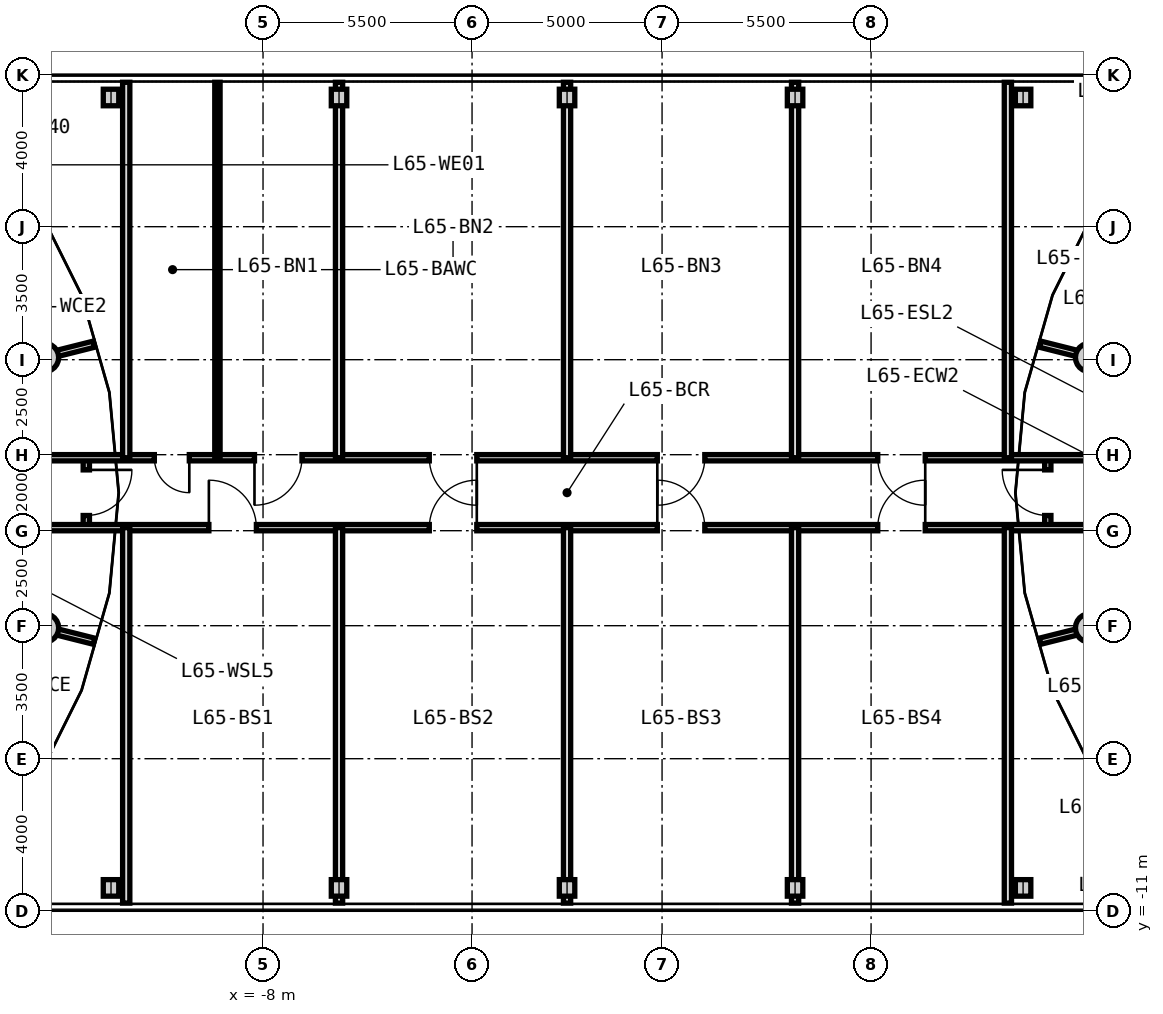
"""IFC4 building model, lengths in metres.
Left out: names, types, materials, properties, quantities, classifications, styles, units other than length and angle.
Written with IfcOpenShell. Run it as: python <this file> out.ifc"""

import sys

from ifc_helpers import new_model, si_unit, direction, frame, frame_2d, origin, origin_2d, place, context, subcontext, project, spatial, rectangle, circle, i_section, extrude, source, transform, mapped, element, fill, save


model = new_model("IFC4")
c1 = context("Model", 3, precision=1e-05, world=origin(), true_north=direction((0.0, 1.0)))
c2 = subcontext(c1, "Body", "Model", "MODEL_VIEW")
j1 = project(units=[si_unit("LENGTHUNIT", "METRE"), si_unit("PLANEANGLEUNIT", "RADIAN")], contexts=[c1])
p1 = place(None, origin())
s1 = spatial("IfcSite", under=j1, at=p1, CompositionType="ELEMENT")
p2 = place(p1, origin())
s2 = spatial("IfcBuilding", under=s1, at=p2, CompositionType="ELEMENT")
p3 = place(p2, frame((0.0, 0.0, 210.85)))
s3 = spatial("IfcBuildingStorey", under=s2, at=p3, CompositionType="ELEMENT", Elevation=210.85)
m1 = source(origin(), c2, "Body", "SweptSolid", [
    extrude(circle(Radius=0.375, at=origin_2d()), origin(), (0.0, 0.0, 1.0), 3.05),
])
for number, where, z_axis, x_axis in (
    (1, (-13.753, 3.559, 0.0), (0.0, 0.0, 1.0), (1.0, 0.0, 0.0)),
    (2, (-13.753, -3.559, 0.0), (0.0, 0.0, 1.0), (1.0, 0.0, 0.0)),
    (3, (13.753, 3.559, 0.0), (0.0, 0.0, 1.0), (1.0, 0.0, 0.0)),
    (4, (13.753, -3.559, 0.0), (0.0, 0.0, 1.0), (1.0, 0.0, 0.0)),
):
    element("IfcColumn", number, at=place(p3, frame(where, z_axis=z_axis, x_axis=x_axis)), inside=s3, PredefinedType="COLUMN", context=c2, shape_type="MappedRepresentation", body=[
        mapped(m1, transform((0.0, 0.0, 0.0), x_axis=(1.0, 0.0, 0.0), y_axis=(0.0, 1.0, 0.0), z_axis=(0.0, 0.0, 1.0), scale=1.0)),
    ])
m2 = source(origin(), c2, "Body", "SweptSolid", [
    extrude(i_section(OverallWidth=0.407, OverallDepth=0.435, WebThickness=0.024, FlangeThickness=0.039, FilletRadius=0.015, at=origin_2d()), origin(), (0.0, 0.0, 1.0), 3.05),
])
for number, where, z_axis, x_axis in (
    (5, (-12.0, -10.4, 0.0), (0.0, 0.0, 1.0), (1.0, 0.0, 0.0)),
    (6, (-12.0, 10.4, 0.0), (0.0, 0.0, 1.0), (1.0, 0.0, 0.0)),
    (7, (-6.0, -10.4, 0.0), (0.0, 0.0, 1.0), (1.0, 0.0, 0.0)),
    (8, (-6.0, 10.4, 0.0), (0.0, 0.0, 1.0), (1.0, 0.0, 0.0)),
    (9, (0.0, -10.4, 0.0), (0.0, 0.0, 1.0), (1.0, 0.0, 0.0)),
    (10, (0.0, 10.4, 0.0), (0.0, 0.0, 1.0), (1.0, 0.0, 0.0)),
    (11, (6.0, -10.4, 0.0), (0.0, 0.0, 1.0), (1.0, 0.0, 0.0)),
    (12, (6.0, 10.4, 0.0), (0.0, 0.0, 1.0), (1.0, 0.0, 0.0)),
    (13, (12.0, -10.4, 0.0), (0.0, 0.0, 1.0), (1.0, 0.0, 0.0)),
    (14, (12.0, 10.4, 0.0), (0.0, 0.0, 1.0), (1.0, 0.0, 0.0)),
):
    element("IfcColumn", number, at=place(p3, frame(where, z_axis=z_axis, x_axis=x_axis)), inside=s3, PredefinedType="COLUMN", context=c2, shape_type="MappedRepresentation", body=[
        mapped(m2, transform((0.0, 0.0, 0.0), x_axis=(1.0, 0.0, 0.0), y_axis=(0.0, 1.0, 0.0), z_axis=(0.0, 0.0, 1.0), scale=1.0)),
    ])
m3 = source(origin(), c2, "Body", "SweptSolid", [
    extrude(rectangle(XDim=6.157, YDim=0.165, at=frame_2d((3.079, 0.0))), origin(), (0.0, 0.0, 1.0), 2.345),
])
for number, where, z_axis, x_axis in (
    (15, (-18.42, -2.407, 0.0), (0.0, 0.0, 1.0), (0.97, -0.244, 0.0)),
    (16, (-18.42, 2.407, 0.0), (0.0, 0.0, 1.0), (0.97, 0.244, 0.0)),
    (17, (18.42, 2.407, 0.0), (0.0, 0.0, 1.0), (-0.97, 0.244, 0.0)),
    (18, (18.42, -2.407, 0.0), (0.0, 0.0, 1.0), (-0.97, -0.244, 0.0)),
):
    element("IfcWall", number, at=place(p3, frame(where, z_axis=z_axis, x_axis=x_axis)), inside=s3, PredefinedType="PARTITIONING", context=c2, shape_type="MappedRepresentation", body=[
        mapped(m3, transform((0.0, 0.0, 0.0), x_axis=(1.0, 0.0, 0.0), y_axis=(0.0, 1.0, 0.0), z_axis=(0.0, 0.0, 1.0), scale=1.0)),
    ])
m4 = source(origin(), c2, "Body", "SweptSolid", [
    extrude(rectangle(XDim=1.84, YDim=0.165, at=frame_2d((0.92, 0.0))), origin(), (0.0, 0.0, 1.0), 2.745),
])
p4 = place(p3, frame((-12.65, -0.92, 0.0), z_axis=(0.0, 0.0, 1.0), x_axis=(0.0, 1.0, 0.0)))
e19 = element("IfcWall", 19, at=p4, inside=s3, PredefinedType="PARTITIONING", context=c2, shape_type="MappedRepresentation", body=[
    mapped(m4, transform((0.0, 0.0, 0.0), x_axis=(1.0, 0.0, 0.0), y_axis=(0.0, 1.0, 0.0), z_axis=(0.0, 0.0, 1.0), scale=1.0)),
])
p5 = place(p4, frame((0.32, 0.0, 0.0)))
e20 = element("IfcOpeningElement", 20, at=p5, cuts=e19, PredefinedType="OPENING", context=c2, shape_type="SweptSolid", body=[
    extrude(rectangle(XDim=1.2, YDim=2.15, at=frame_2d((0.6, 1.075))), frame((0.0, 0.093, 0.0), z_axis=(0.0, -1.0, 0.0), x_axis=(1.0, 0.0, 0.0)), (0.0, 0.0, 1.0), 0.185),
])
p6 = place(p3, frame((12.65, -0.92, 0.0), z_axis=(0.0, 0.0, 1.0), x_axis=(0.0, 1.0, 0.0)))
e21 = element("IfcWall", 21, at=p6, inside=s3, PredefinedType="PARTITIONING", context=c2, shape_type="MappedRepresentation", body=[
    mapped(m4, transform((0.0, 0.0, 0.0), x_axis=(1.0, 0.0, 0.0), y_axis=(0.0, 1.0, 0.0), z_axis=(0.0, 0.0, 1.0), scale=1.0)),
])
p7 = place(p6, frame((0.32, 0.0, 0.0)))
e22 = element("IfcOpeningElement", 22, at=p7, cuts=e21, PredefinedType="OPENING", context=c2, shape_type="SweptSolid", body=[
    extrude(rectangle(XDim=1.2, YDim=2.15, at=frame_2d((0.6, 1.075))), frame((0.0, 0.093, 0.0), z_axis=(0.0, -1.0, 0.0), x_axis=(1.0, 0.0, 0.0)), (0.0, 0.0, 1.0), 0.185),
])
m5 = source(origin(), c2, "Body", "SweptSolid", [
    extrude(rectangle(XDim=37.0, YDim=0.165, at=frame_2d((18.5, 0.0))), origin(), (0.0, 0.0, 1.0), 2.745),
])
p8 = place(p3, frame((-18.5, -0.92, 0.0), z_axis=(0.0, 0.0, 1.0), x_axis=(1.0, 0.0, 0.0)))
e23 = element("IfcWall", 23, at=p8, inside=s3, PredefinedType="PARTITIONING", context=c2, shape_type="MappedRepresentation", body=[
    mapped(m5, transform((0.0, 0.0, 0.0), x_axis=(1.0, 0.0, 0.0), y_axis=(0.0, 1.0, 0.0), z_axis=(0.0, 0.0, 1.0), scale=1.0)),
])
p9 = place(p8, frame((2.662, 0.0, 0.0)))
e24 = element("IfcOpeningElement", 24, at=p9, cuts=e23, PredefinedType="OPENING", context=c2, shape_type="SweptSolid", body=[
    extrude(rectangle(XDim=0.95, YDim=2.1, at=frame_2d((0.475, 1.05))), frame((0.0, 0.093, 0.0), z_axis=(0.0, -1.0, 0.0), x_axis=(1.0, 0.0, 0.0)), (0.0, 0.0, 1.0), 0.185),
])
p10 = place(p8, frame((33.388, 0.0, 0.0)))
e25 = element("IfcOpeningElement", 25, at=p10, cuts=e23, PredefinedType="OPENING", context=c2, shape_type="SweptSolid", body=[
    extrude(rectangle(XDim=0.95, YDim=2.1, at=frame_2d((0.475, 1.05))), frame((0.0, 0.093, 0.0), z_axis=(0.0, -1.0, 0.0), x_axis=(1.0, 0.0, 0.0)), (0.0, 0.0, 1.0), 0.185),
])
p11 = place(p8, frame((9.075, 0.0, 0.0)))
e26 = element("IfcOpeningElement", 26, at=p11, cuts=e23, PredefinedType="OPENING", context=c2, shape_type="SweptSolid", body=[
    extrude(rectangle(XDim=1.25, YDim=2.2, at=frame_2d((0.625, 1.1))), frame((0.0, 0.093, 0.0), z_axis=(0.0, -1.0, 0.0), x_axis=(1.0, 0.0, 0.0)), (0.0, 0.0, 1.0), 0.185),
])
p12 = place(p8, frame((14.875, 0.0, 0.0)))
e27 = element("IfcOpeningElement", 27, at=p12, cuts=e23, PredefinedType="OPENING", context=c2, shape_type="SweptSolid", body=[
    extrude(rectangle(XDim=1.25, YDim=2.2, at=frame_2d((0.625, 1.1))), frame((0.0, 0.093, 0.0), z_axis=(0.0, -1.0, 0.0), x_axis=(1.0, 0.0, 0.0)), (0.0, 0.0, 1.0), 0.185),
])
p13 = place(p8, frame((20.875, 0.0, 0.0)))
e28 = element("IfcOpeningElement", 28, at=p13, cuts=e23, PredefinedType="OPENING", context=c2, shape_type="SweptSolid", body=[
    extrude(rectangle(XDim=1.25, YDim=2.2, at=frame_2d((0.625, 1.1))), frame((0.0, 0.093, 0.0), z_axis=(0.0, -1.0, 0.0), x_axis=(1.0, 0.0, 0.0)), (0.0, 0.0, 1.0), 0.185),
])
p14 = place(p8, frame((26.675, 0.0, 0.0)))
e29 = element("IfcOpeningElement", 29, at=p14, cuts=e23, PredefinedType="OPENING", context=c2, shape_type="SweptSolid", body=[
    extrude(rectangle(XDim=1.25, YDim=2.2, at=frame_2d((0.625, 1.1))), frame((0.0, 0.093, 0.0), z_axis=(0.0, -1.0, 0.0), x_axis=(1.0, 0.0, 0.0)), (0.0, 0.0, 1.0), 0.185),
])
p15 = place(p3, frame((-18.5, 0.92, 0.0), z_axis=(0.0, 0.0, 1.0), x_axis=(1.0, 0.0, 0.0)))
e30 = element("IfcWall", 30, at=p15, inside=s3, PredefinedType="PARTITIONING", context=c2, shape_type="MappedRepresentation", body=[
    mapped(m5, transform((0.0, 0.0, 0.0), x_axis=(1.0, 0.0, 0.0), y_axis=(0.0, 1.0, 0.0), z_axis=(0.0, 0.0, 1.0), scale=1.0)),
])
p16 = place(p15, frame((2.662, 0.0, 0.0)))
e31 = element("IfcOpeningElement", 31, at=p16, cuts=e30, PredefinedType="OPENING", context=c2, shape_type="SweptSolid", body=[
    extrude(rectangle(XDim=0.95, YDim=2.1, at=frame_2d((0.475, 1.05))), frame((0.0, 0.093, 0.0), z_axis=(0.0, -1.0, 0.0), x_axis=(1.0, 0.0, 0.0)), (0.0, 0.0, 1.0), 0.185),
])
p17 = place(p15, frame((33.388, 0.0, 0.0)))
e32 = element("IfcOpeningElement", 32, at=p17, cuts=e30, PredefinedType="OPENING", context=c2, shape_type="SweptSolid", body=[
    extrude(rectangle(XDim=0.95, YDim=2.1, at=frame_2d((0.475, 1.05))), frame((0.0, 0.093, 0.0), z_axis=(0.0, -1.0, 0.0), x_axis=(1.0, 0.0, 0.0)), (0.0, 0.0, 1.0), 0.185),
])
p18 = place(p15, frame((7.64, 0.0, 0.0)))
e33 = element("IfcOpeningElement", 33, at=p18, cuts=e30, PredefinedType="OPENING", context=c2, shape_type="SweptSolid", body=[
    extrude(rectangle(XDim=0.92, YDim=2.1, at=frame_2d((0.46, 1.05))), frame((0.0, 0.093, 0.0), z_axis=(0.0, -1.0, 0.0), x_axis=(1.0, 0.0, 0.0)), (0.0, 0.0, 1.0), 0.185),
])
p19 = place(p15, frame((10.275, 0.0, 0.0)))
e34 = element("IfcOpeningElement", 34, at=p19, cuts=e30, PredefinedType="OPENING", context=c2, shape_type="SweptSolid", body=[
    extrude(rectangle(XDim=1.25, YDim=2.2, at=frame_2d((0.625, 1.1))), frame((0.0, 0.093, 0.0), z_axis=(0.0, -1.0, 0.0), x_axis=(1.0, 0.0, 0.0)), (0.0, 0.0, 1.0), 0.185),
])
p20 = place(p15, frame((14.875, 0.0, 0.0)))
e35 = element("IfcOpeningElement", 35, at=p20, cuts=e30, PredefinedType="OPENING", context=c2, shape_type="SweptSolid", body=[
    extrude(rectangle(XDim=1.25, YDim=2.2, at=frame_2d((0.625, 1.1))), frame((0.0, 0.093, 0.0), z_axis=(0.0, -1.0, 0.0), x_axis=(1.0, 0.0, 0.0)), (0.0, 0.0, 1.0), 0.185),
])
p21 = place(p15, frame((20.875, 0.0, 0.0)))
e36 = element("IfcOpeningElement", 36, at=p21, cuts=e30, PredefinedType="OPENING", context=c2, shape_type="SweptSolid", body=[
    extrude(rectangle(XDim=1.25, YDim=2.2, at=frame_2d((0.625, 1.1))), frame((0.0, 0.093, 0.0), z_axis=(0.0, -1.0, 0.0), x_axis=(1.0, 0.0, 0.0)), (0.0, 0.0, 1.0), 0.185),
])
p22 = place(p15, frame((26.675, 0.0, 0.0)))
e37 = element("IfcOpeningElement", 37, at=p22, cuts=e30, PredefinedType="OPENING", context=c2, shape_type="SweptSolid", body=[
    extrude(rectangle(XDim=1.25, YDim=2.2, at=frame_2d((0.625, 1.1))), frame((0.0, 0.093, 0.0), z_axis=(0.0, -1.0, 0.0), x_axis=(1.0, 0.0, 0.0)), (0.0, 0.0, 1.0), 0.185),
])
m6 = source(origin(), c2, "Body", "SweptSolid", [
    extrude(rectangle(XDim=9.88, YDim=0.19, at=frame_2d((4.94, 0.0))), origin(), (0.0, 0.0, 1.0), 2.745),
])
for number, where, z_axis, x_axis in (
    (38, (-11.6, -10.8, 0.0), (0.0, 0.0, 1.0), (0.0, 1.0, 0.0)),
    (39, (-11.6, 0.92, 0.0), (0.0, 0.0, 1.0), (0.0, 1.0, 0.0)),
    (40, (11.6, -10.8, 0.0), (0.0, 0.0, 1.0), (0.0, 1.0, 0.0)),
    (41, (11.6, 0.92, 0.0), (0.0, 0.0, 1.0), (0.0, 1.0, 0.0)),
):
    element("IfcWall", number, at=place(p3, frame(where, z_axis=z_axis, x_axis=x_axis)), inside=s3, PredefinedType="PARTITIONING", context=c2, shape_type="MappedRepresentation", body=[
        mapped(m6, transform((0.0, 0.0, 0.0), x_axis=(1.0, 0.0, 0.0), y_axis=(0.0, 1.0, 0.0), z_axis=(0.0, 0.0, 1.0), scale=1.0)),
    ])
m7 = source(origin(), c2, "Body", "SweptSolid", [
    extrude(rectangle(XDim=9.88, YDim=0.19, at=frame_2d((4.94, 0.0))), origin(), (0.0, 0.0, 1.0), 2.045),
])
for number, where, z_axis, x_axis in (
    (42, (-6.0, -10.8, 0.0), (0.0, 0.0, 1.0), (0.0, 1.0, 0.0)),
    (43, (-6.0, 0.92, 0.0), (0.0, 0.0, 1.0), (0.0, 1.0, 0.0)),
):
    element("IfcWall", number, at=place(p3, frame(where, z_axis=z_axis, x_axis=x_axis)), inside=s3, PredefinedType="PARTITIONING", context=c2, shape_type="MappedRepresentation", body=[
        mapped(m7, transform((0.0, 0.0, 0.0), x_axis=(1.0, 0.0, 0.0), y_axis=(0.0, 1.0, 0.0), z_axis=(0.0, 0.0, 1.0), scale=1.0)),
    ])
m8 = source(origin(), c2, "Body", "SweptSolid", [
    extrude(rectangle(XDim=9.88, YDim=0.14, at=frame_2d((4.94, 0.0))), origin(), (0.0, 0.0, 1.0), 2.745),
])
p23 = place(p3, frame((-9.2, 0.92, 0.0), z_axis=(0.0, 0.0, 1.0), x_axis=(0.0, 1.0, 0.0)))
e44 = element("IfcWall", 44, at=p23, inside=s3, PredefinedType="PARTITIONING", context=c2, shape_type="MappedRepresentation", body=[
    mapped(m8, transform((0.0, 0.0, 0.0), x_axis=(1.0, 0.0, 0.0), y_axis=(0.0, 1.0, 0.0), z_axis=(0.0, 0.0, 1.0), scale=1.0)),
])
for number, where, z_axis, x_axis in (
    (45, (0.0, -10.8, 0.0), (0.0, 0.0, 1.0), (0.0, 1.0, 0.0)),
    (46, (0.0, 0.92, 0.0), (0.0, 0.0, 1.0), (0.0, 1.0, 0.0)),
    (47, (6.0, -10.8, 0.0), (0.0, 0.0, 1.0), (0.0, 1.0, 0.0)),
    (48, (6.0, 0.92, 0.0), (0.0, 0.0, 1.0), (0.0, 1.0, 0.0)),
):
    element("IfcWall", number, at=place(p3, frame(where, z_axis=z_axis, x_axis=x_axis)), inside=s3, PredefinedType="PARTITIONING", context=c2, shape_type="MappedRepresentation", body=[
        mapped(m7, transform((0.0, 0.0, 0.0), x_axis=(1.0, 0.0, 0.0), y_axis=(0.0, 1.0, 0.0), z_axis=(0.0, 0.0, 1.0), scale=1.0)),
    ])
m9 = source(origin(), c2, "Body", "SweptSolid", [
    extrude(rectangle(XDim=1.2, YDim=2.15, at=frame_2d((0.6, 1.075))), frame((0.0, 0.025, 0.0), z_axis=(0.0, -1.0, 0.0), x_axis=(1.0, 0.0, 0.0)), (0.0, 0.0, 1.0), 0.05),
])
p24 = place(p5, frame((1.2, 0.0, 0.0), z_axis=(0.0, 0.0, 1.0), x_axis=(-1.0, 0.0, 0.0)))
e49 = element("IfcDoor", 49, at=p24, inside=s3, OperationType="SINGLE_SWING_LEFT", PredefinedType="DOOR", context=c2, shape_type="MappedRepresentation", body=[
    mapped(m9, transform((0.0, 0.0, 0.0), x_axis=(1.0, 0.0, 0.0), y_axis=(0.0, 1.0, 0.0), z_axis=(0.0, 0.0, 1.0), scale=1.0)),
])
fill(e20, e49)
p25 = place(p7, origin())
e50 = element("IfcDoor", 50, at=p25, inside=s3, OperationType="SINGLE_SWING_RIGHT", PredefinedType="DOOR", context=c2, shape_type="MappedRepresentation", body=[
    mapped(m9, transform((0.0, 0.0, 0.0), x_axis=(1.0, 0.0, 0.0), y_axis=(0.0, 1.0, 0.0), z_axis=(0.0, 0.0, 1.0), scale=1.0)),
])
fill(e22, e50)
m10 = source(origin(), c2, "Body", "SweptSolid", [
    extrude(rectangle(XDim=1.25, YDim=2.2, at=frame_2d((0.625, 1.1))), frame((0.0, 0.025, 0.0), z_axis=(0.0, -1.0, 0.0), x_axis=(1.0, 0.0, 0.0)), (0.0, 0.0, 1.0), 0.05),
])
p26 = place(p11, origin())
e51 = element("IfcDoor", 51, at=p26, inside=s3, OperationType="SINGLE_SWING_LEFT", PredefinedType="DOOR", context=c2, shape_type="MappedRepresentation", body=[
    mapped(m10, transform((0.0, 0.0, 0.0), x_axis=(1.0, 0.0, 0.0), y_axis=(0.0, 1.0, 0.0), z_axis=(0.0, 0.0, 1.0), scale=1.0)),
])
fill(e26, e51)
m11 = source(origin(), c2, "Body", "SweptSolid", [
    extrude(rectangle(XDim=0.92, YDim=2.1, at=frame_2d((0.46, 1.05))), frame((0.0, 0.025, 0.0), z_axis=(0.0, -1.0, 0.0), x_axis=(1.0, 0.0, 0.0)), (0.0, 0.0, 1.0), 0.05),
])
p27 = place(p18, frame((0.92, 0.0, 0.0), z_axis=(0.0, 0.0, 1.0), x_axis=(-1.0, 0.0, 0.0)))
e52 = element("IfcDoor", 52, at=p27, inside=s3, OperationType="SINGLE_SWING_LEFT", PredefinedType="DOOR", context=c2, shape_type="MappedRepresentation", body=[
    mapped(m11, transform((0.0, 0.0, 0.0), x_axis=(1.0, 0.0, 0.0), y_axis=(0.0, 1.0, 0.0), z_axis=(0.0, 0.0, 1.0), scale=1.0)),
])
fill(e33, e52)
p28 = place(p19, frame((1.25, 0.0, 0.0), z_axis=(0.0, 0.0, 1.0), x_axis=(-1.0, 0.0, 0.0)))
e53 = element("IfcDoor", 53, at=p28, inside=s3, OperationType="SINGLE_SWING_RIGHT", PredefinedType="DOOR", context=c2, shape_type="MappedRepresentation", body=[
    mapped(m10, transform((0.0, 0.0, 0.0), x_axis=(1.0, 0.0, 0.0), y_axis=(0.0, 1.0, 0.0), z_axis=(0.0, 0.0, 1.0), scale=1.0)),
])
fill(e34, e53)
p29 = place(p12, origin())
e54 = element("IfcDoor", 54, at=p29, inside=s3, OperationType="SINGLE_SWING_RIGHT", PredefinedType="DOOR", context=c2, shape_type="MappedRepresentation", body=[
    mapped(m10, transform((0.0, 0.0, 0.0), x_axis=(1.0, 0.0, 0.0), y_axis=(0.0, 1.0, 0.0), z_axis=(0.0, 0.0, 1.0), scale=1.0)),
])
fill(e27, e54)
p30 = place(p20, frame((1.25, 0.0, 0.0), z_axis=(0.0, 0.0, 1.0), x_axis=(-1.0, 0.0, 0.0)))
e55 = element("IfcDoor", 55, at=p30, inside=s3, OperationType="SINGLE_SWING_LEFT", PredefinedType="DOOR", context=c2, shape_type="MappedRepresentation", body=[
    mapped(m10, transform((0.0, 0.0, 0.0), x_axis=(1.0, 0.0, 0.0), y_axis=(0.0, 1.0, 0.0), z_axis=(0.0, 0.0, 1.0), scale=1.0)),
])
fill(e35, e55)
p31 = place(p13, origin())
e56 = element("IfcDoor", 56, at=p31, inside=s3, OperationType="SINGLE_SWING_LEFT", PredefinedType="DOOR", context=c2, shape_type="MappedRepresentation", body=[
    mapped(m10, transform((0.0, 0.0, 0.0), x_axis=(1.0, 0.0, 0.0), y_axis=(0.0, 1.0, 0.0), z_axis=(0.0, 0.0, 1.0), scale=1.0)),
])
fill(e28, e56)
p32 = place(p21, frame((1.25, 0.0, 0.0), z_axis=(0.0, 0.0, 1.0), x_axis=(-1.0, 0.0, 0.0)))
e57 = element("IfcDoor", 57, at=p32, inside=s3, OperationType="SINGLE_SWING_RIGHT", PredefinedType="DOOR", context=c2, shape_type="MappedRepresentation", body=[
    mapped(m10, transform((0.0, 0.0, 0.0), x_axis=(1.0, 0.0, 0.0), y_axis=(0.0, 1.0, 0.0), z_axis=(0.0, 0.0, 1.0), scale=1.0)),
])
fill(e36, e57)
p33 = place(p14, origin())
e58 = element("IfcDoor", 58, at=p33, inside=s3, OperationType="SINGLE_SWING_RIGHT", PredefinedType="DOOR", context=c2, shape_type="MappedRepresentation", body=[
    mapped(m10, transform((0.0, 0.0, 0.0), x_axis=(1.0, 0.0, 0.0), y_axis=(0.0, 1.0, 0.0), z_axis=(0.0, 0.0, 1.0), scale=1.0)),
])
fill(e29, e58)
p34 = place(p22, frame((1.25, 0.0, 0.0), z_axis=(0.0, 0.0, 1.0), x_axis=(-1.0, 0.0, 0.0)))
e59 = element("IfcDoor", 59, at=p34, inside=s3, OperationType="SINGLE_SWING_LEFT", PredefinedType="DOOR", context=c2, shape_type="MappedRepresentation", body=[
    mapped(m10, transform((0.0, 0.0, 0.0), x_axis=(1.0, 0.0, 0.0), y_axis=(0.0, 1.0, 0.0), z_axis=(0.0, 0.0, 1.0), scale=1.0)),
])
fill(e37, e59)
save(model, sys.argv[1])
